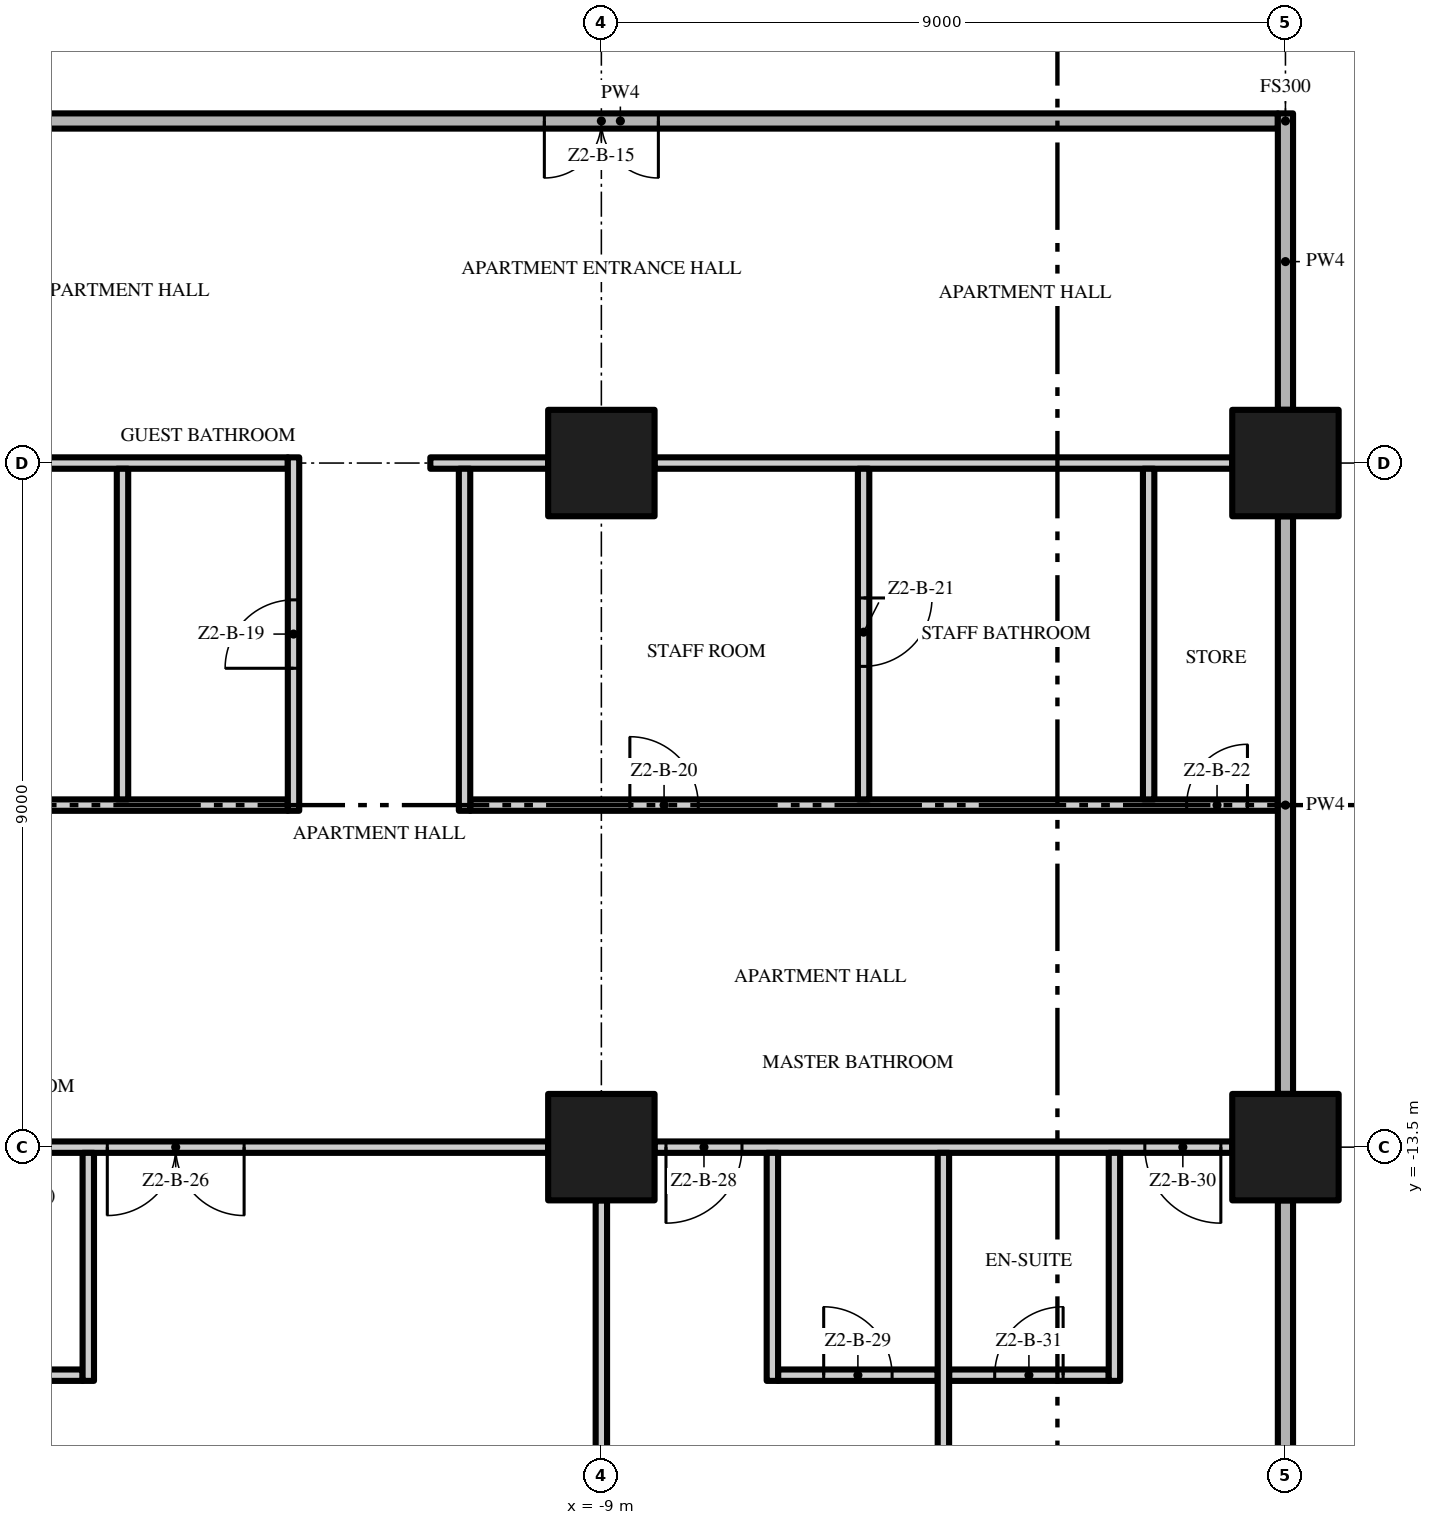
"""IFC4 building model, lengths in metres.
Left out: names, types, materials, properties, quantities, classifications, styles, units other than length and angle.
Written with IfcOpenShell. Run it as: python <this file> out.ifc"""

import sys

from ifc_helpers import new_model, si_unit, direction, frame, frame_2d, origin, origin_2d, place, context, subcontext, project, spatial, rectangle, extrude, element, fill, save


model = new_model("IFC4")
c1 = context("Model", 3, precision=1e-05, world=origin(), true_north=direction((0.0, 1.0)))
c2 = subcontext(c1, "Body", "Model", "MODEL_VIEW")
j1 = project(units=[si_unit("LENGTHUNIT", "METRE"), si_unit("PLANEANGLEUNIT", "RADIAN")], contexts=[c1])
p1 = place(None, origin())
s1 = spatial("IfcSite", under=j1, at=p1, CompositionType="ELEMENT")
p2 = place(p1, origin())
s2 = spatial("IfcBuilding", under=s1, at=p2, CompositionType="ELEMENT")
p3 = place(p2, frame((0.0, 0.0, 80.8)))
s3 = spatial("IfcBuildingStorey", under=s2, at=p3, CompositionType="ELEMENT", Elevation=80.8)
for number, where, z_axis, x_axis in (
    (1, (-9.0, -13.5, 0.0), (0.0, 0.0, 1.0), (1.0, 0.0, 0.0)),
    (2, (-9.0, -4.5, 0.0), (0.0, 0.0, 1.0), (1.0, 0.0, 0.0)),
    (3, (0.0, -13.5, 0.0), (0.0, 0.0, 1.0), (1.0, 0.0, 0.0)),
    (4, (0.0, -4.5, 0.0), (0.0, 0.0, 1.0), (1.0, 0.0, 0.0)),
):
    element("IfcColumn", number, at=place(p3, frame(where, z_axis=z_axis, x_axis=x_axis)), inside=s3, PredefinedType="COLUMN", context=c2, shape_type="SweptSolid", body=[
        extrude(rectangle(XDim=1.4, YDim=1.4, at=origin_2d()), origin(), (0.0, 0.0, 1.0), 3.5),
    ])
p4 = place(p3, frame((-17.925, -16.5, 0.0), z_axis=(0.0, 0.0, 1.0), x_axis=(1.0, 0.0, 0.0)))
e5 = element("IfcWall", 5, at=p4, inside=s3, PredefinedType="PARTITIONING", context=c2, shape_type="SweptSolid", body=[
    extrude(rectangle(XDim=2.1, YDim=0.15, at=frame_2d((1.05, 0.0))), origin(), (0.0, 0.0, 1.0), 3.5),
])
p5 = place(p4, frame((0.6, 0.0, 0.0)))
e6 = element("IfcOpeningElement", 6, at=p5, cuts=e5, PredefinedType="OPENING", context=c2, shape_type="SweptSolid", body=[
    extrude(rectangle(XDim=0.9, YDim=2.1, at=frame_2d((0.45, 1.05))), frame((0.0, 0.085, 0.0), z_axis=(0.0, -1.0, 0.0), x_axis=(1.0, 0.0, 0.0)), (0.0, 0.0, 1.0), 0.17),
])
p6 = place(p3, frame((-6.675, -16.5, 0.0), z_axis=(0.0, 0.0, 1.0), x_axis=(1.0, 0.0, 0.0)))
e7 = element("IfcWall", 7, at=p6, inside=s3, PredefinedType="PARTITIONING", context=c2, shape_type="SweptSolid", body=[
    extrude(rectangle(XDim=2.1, YDim=0.15, at=frame_2d((1.05, 0.0))), origin(), (0.0, 0.0, 1.0), 3.5),
])
p7 = place(p6, frame((0.6, 0.0, 0.0)))
e8 = element("IfcOpeningElement", 8, at=p7, cuts=e7, PredefinedType="OPENING", context=c2, shape_type="SweptSolid", body=[
    extrude(rectangle(XDim=0.9, YDim=2.1, at=frame_2d((0.45, 1.05))), frame((0.0, 0.085, 0.0), z_axis=(0.0, -1.0, 0.0), x_axis=(1.0, 0.0, 0.0)), (0.0, 0.0, 1.0), 0.17),
])
p8 = place(p3, frame((-4.425, -16.5, 0.0), z_axis=(0.0, 0.0, 1.0), x_axis=(1.0, 0.0, 0.0)))
e9 = element("IfcWall", 9, at=p8, inside=s3, PredefinedType="PARTITIONING", context=c2, shape_type="SweptSolid", body=[
    extrude(rectangle(XDim=2.1, YDim=0.15, at=frame_2d((1.05, 0.0))), origin(), (0.0, 0.0, 1.0), 3.5),
])
p9 = place(p8, frame((0.6, 0.0, 0.0)))
e10 = element("IfcOpeningElement", 10, at=p9, cuts=e9, PredefinedType="OPENING", context=c2, shape_type="SweptSolid", body=[
    extrude(rectangle(XDim=0.9, YDim=2.1, at=frame_2d((0.45, 1.05))), frame((0.0, 0.085, 0.0), z_axis=(0.0, -1.0, 0.0), x_axis=(1.0, 0.0, 0.0)), (0.0, 0.0, 1.0), 0.17),
])
p10 = place(p3, frame((-9.7, -13.5, 0.0), z_axis=(0.0, 0.0, 1.0), x_axis=(-1.0, 0.0, 0.0)))
e11 = element("IfcWall", 11, at=p10, inside=s3, PredefinedType="PARTITIONING", context=c2, shape_type="SweptSolid", body=[
    extrude(rectangle(XDim=7.6, YDim=0.15, at=frame_2d((3.8, 0.0))), origin(), (0.0, 0.0, 1.0), 3.5),
])
p11 = place(p10, frame((4.0, 0.0, 0.0)))
e12 = element("IfcOpeningElement", 12, at=p11, cuts=e11, PredefinedType="OPENING", context=c2, shape_type="SweptSolid", body=[
    extrude(rectangle(XDim=1.8, YDim=2.4, at=frame_2d((0.9, 1.2))), frame((0.0, 0.085, 0.0), z_axis=(0.0, -1.0, 0.0), x_axis=(1.0, 0.0, 0.0)), (0.0, 0.0, 1.0), 0.17),
])
p12 = place(p3, frame((-0.7, -13.5, 0.0), z_axis=(0.0, 0.0, 1.0), x_axis=(-1.0, 0.0, 0.0)))
e13 = element("IfcWall", 13, at=p12, inside=s3, PredefinedType="PARTITIONING", context=c2, shape_type="SweptSolid", body=[
    extrude(rectangle(XDim=7.6, YDim=0.15, at=frame_2d((3.8, 0.0))), origin(), (0.0, 0.0, 1.0), 3.5),
])
p13 = place(p12, frame((6.45, 0.0, 0.0)))
e14 = element("IfcOpeningElement", 14, at=p13, cuts=e13, PredefinedType="OPENING", context=c2, shape_type="SweptSolid", body=[
    extrude(rectangle(XDim=1.0, YDim=2.4, at=frame_2d((0.5, 1.2))), frame((0.0, 0.085, 0.0), z_axis=(0.0, -1.0, 0.0), x_axis=(1.0, 0.0, 0.0)), (0.0, 0.0, 1.0), 0.17),
])
p14 = place(p12, frame((0.15, 0.0, 0.0)))
e15 = element("IfcOpeningElement", 15, at=p14, cuts=e13, PredefinedType="OPENING", context=c2, shape_type="SweptSolid", body=[
    extrude(rectangle(XDim=1.0, YDim=2.4, at=frame_2d((0.5, 1.2))), frame((0.0, 0.085, 0.0), z_axis=(0.0, -1.0, 0.0), x_axis=(1.0, 0.0, 0.0)), (0.0, 0.0, 1.0), 0.17),
])
p15 = place(p3, frame((-26.7, -9.0, 0.0), z_axis=(0.0, 0.0, 1.0), x_axis=(1.0, 0.0, 0.0)))
e16 = element("IfcWall", 16, at=p15, inside=s3, PredefinedType="PARTITIONING", context=c2, shape_type="SweptSolid", body=[
    extrude(rectangle(XDim=13.575, YDim=0.15, at=frame_2d((6.787, 0.0))), origin(), (0.0, 0.0, 1.0), 3.5),
])
p16 = place(p3, frame((-10.725, -9.0, 0.0), z_axis=(0.0, 0.0, 1.0), x_axis=(1.0, 0.0, 0.0)))
e17 = element("IfcWall", 17, at=p16, inside=s3, PredefinedType="PARTITIONING", context=c2, shape_type="SweptSolid", body=[
    extrude(rectangle(XDim=10.625, YDim=0.15, at=frame_2d((5.312, 0.0))), origin(), (0.0, 0.0, 1.0), 3.5),
])
p17 = place(p16, frame((2.1, 0.0, 0.0)))
e18 = element("IfcOpeningElement", 18, at=p17, cuts=e17, PredefinedType="OPENING", context=c2, shape_type="SweptSolid", body=[
    extrude(rectangle(XDim=0.9, YDim=2.1, at=frame_2d((0.45, 1.05))), frame((0.0, 0.085, 0.0), z_axis=(0.0, -1.0, 0.0), x_axis=(1.0, 0.0, 0.0)), (0.0, 0.0, 1.0), 0.17),
])
p18 = place(p16, frame((9.425, 0.0, 0.0)))
e19 = element("IfcOpeningElement", 19, at=p18, cuts=e17, PredefinedType="OPENING", context=c2, shape_type="SweptSolid", body=[
    extrude(rectangle(XDim=0.8, YDim=2.0, at=frame_2d((0.4, 1.0))), frame((0.0, 0.085, 0.0), z_axis=(0.0, -1.0, 0.0), x_axis=(1.0, 0.0, 0.0)), (0.0, 0.0, 1.0), 0.17),
])
p19 = place(p3, frame((-17.3, -4.5, 0.0), z_axis=(0.0, 0.0, 1.0), x_axis=(1.0, 0.0, 0.0)))
e20 = element("IfcWall", 20, at=p19, inside=s3, PredefinedType="PARTITIONING", context=c2, shape_type="SweptSolid", body=[
    extrude(rectangle(XDim=4.175, YDim=0.15, at=frame_2d((2.087, 0.0))), origin(), (0.0, 0.0, 1.0), 3.5),
])
p20 = place(p3, frame((-11.25, -4.5, 0.0), z_axis=(0.0, 0.0, 1.0), x_axis=(1.0, 0.0, 0.0)))
e21 = element("IfcWall", 21, at=p20, inside=s3, PredefinedType="PARTITIONING", context=c2, shape_type="SweptSolid", body=[
    extrude(rectangle(XDim=1.55, YDim=0.15, at=frame_2d((0.775, 0.0))), origin(), (0.0, 0.0, 1.0), 3.5),
])
p21 = place(p3, frame((-8.3, -4.5, 0.0), z_axis=(0.0, 0.0, 1.0), x_axis=(1.0, 0.0, 0.0)))
e22 = element("IfcWall", 22, at=p21, inside=s3, PredefinedType="PARTITIONING", context=c2, shape_type="SweptSolid", body=[
    extrude(rectangle(XDim=7.6, YDim=0.15, at=frame_2d((3.8, 0.0))), origin(), (0.0, 0.0, 1.0), 3.5),
])
p22 = place(p3, frame((-0.1, 0.0, 0.0), z_axis=(0.0, 0.0, 1.0), x_axis=(-1.0, 0.0, 0.0)))
e23 = element("IfcWall", 23, at=p22, inside=s3, PredefinedType="PARTITIONING", context=c2, shape_type="SweptSolid", body=[
    extrude(rectangle(XDim=17.3, YDim=0.2, at=frame_2d((8.65, 0.0))), origin(), (0.0, 0.0, 1.0), 3.5),
])
p23 = place(p22, frame((8.15, 0.0, 0.0)))
e24 = element("IfcOpeningElement", 24, at=p23, cuts=e23, PredefinedType="OPENING", context=c2, shape_type="SweptSolid", body=[
    extrude(rectangle(XDim=1.5, YDim=2.4, at=frame_2d((0.75, 1.2))), frame((0.0, 0.11, 0.0), z_axis=(0.0, -1.0, 0.0), x_axis=(1.0, 0.0, 0.0)), (0.0, 0.0, 1.0), 0.22),
])
p24 = place(p3, frame((-15.75, -16.575, 0.0), z_axis=(0.0, 0.0, 1.0), x_axis=(0.0, 1.0, 0.0)))
e25 = element("IfcWall", 25, at=p24, inside=s3, PredefinedType="PARTITIONING", context=c2, shape_type="SweptSolid", body=[
    extrude(rectangle(XDim=3.0, YDim=0.15, at=frame_2d((1.5, 0.0))), origin(), (0.0, 0.0, 1.0), 3.5),
])
p25 = place(p3, frame((-15.3, -8.925, 0.0), z_axis=(0.0, 0.0, 1.0), x_axis=(0.0, 1.0, 0.0)))
e26 = element("IfcWall", 26, at=p25, inside=s3, PredefinedType="PARTITIONING", context=c2, shape_type="SweptSolid", body=[
    extrude(rectangle(XDim=4.35, YDim=0.15, at=frame_2d((2.175, 0.0))), origin(), (0.0, 0.0, 1.0), 3.5),
])
p26 = place(p3, frame((-13.05, -9.075, 0.0), z_axis=(0.0, 0.0, 1.0), x_axis=(0.0, 1.0, 0.0)))
e27 = element("IfcWall", 27, at=p26, inside=s3, PredefinedType="PARTITIONING", context=c2, shape_type="SweptSolid", body=[
    extrude(rectangle(XDim=4.65, YDim=0.15, at=frame_2d((2.325, 0.0))), origin(), (0.0, 0.0, 1.0), 3.5),
])
p27 = place(p26, frame((1.875, 0.0, 0.0)))
e28 = element("IfcOpeningElement", 28, at=p27, cuts=e27, PredefinedType="OPENING", context=c2, shape_type="SweptSolid", body=[
    extrude(rectangle(XDim=0.9, YDim=2.1, at=frame_2d((0.45, 1.05))), frame((0.0, 0.085, 0.0), z_axis=(0.0, -1.0, 0.0), x_axis=(1.0, 0.0, 0.0)), (0.0, 0.0, 1.0), 0.17),
])
p28 = place(p3, frame((-10.8, -9.075, 0.0), z_axis=(0.0, 0.0, 1.0), x_axis=(0.0, 1.0, 0.0)))
e29 = element("IfcWall", 29, at=p28, inside=s3, PredefinedType="PARTITIONING", context=c2, shape_type="SweptSolid", body=[
    extrude(rectangle(XDim=4.5, YDim=0.15, at=frame_2d((2.25, 0.0))), origin(), (0.0, 0.0, 1.0), 3.5),
])
p29 = place(p3, frame((-9.0, -21.2, 0.0), z_axis=(0.0, 0.0, 1.0), x_axis=(0.0, 1.0, 0.0)))
e30 = element("IfcWall", 30, at=p29, inside=s3, PredefinedType="PARTITIONING", context=c2, shape_type="SweptSolid", body=[
    extrude(rectangle(XDim=7.0, YDim=0.15, at=frame_2d((3.5, 0.0))), origin(), (0.0, 0.0, 1.0), 3.5),
])
p30 = place(p3, frame((-6.75, -16.575, 0.0), z_axis=(0.0, 0.0, 1.0), x_axis=(0.0, 1.0, 0.0)))
e31 = element("IfcWall", 31, at=p30, inside=s3, PredefinedType="PARTITIONING", context=c2, shape_type="SweptSolid", body=[
    extrude(rectangle(XDim=3.0, YDim=0.15, at=frame_2d((1.5, 0.0))), origin(), (0.0, 0.0, 1.0), 3.5),
])
p31 = place(p3, frame((-5.55, -4.575, 0.0), z_axis=(0.0, 0.0, 1.0), x_axis=(0.0, -1.0, 0.0)))
e32 = element("IfcWall", 32, at=p31, inside=s3, PredefinedType="PARTITIONING", context=c2, shape_type="SweptSolid", body=[
    extrude(rectangle(XDim=4.35, YDim=0.15, at=frame_2d((2.175, 0.0))), origin(), (0.0, 0.0, 1.0), 3.5),
])
p32 = place(p31, frame((1.7, 0.0, 0.0)))
e33 = element("IfcOpeningElement", 33, at=p32, cuts=e32, PredefinedType="OPENING", context=c2, shape_type="SweptSolid", body=[
    extrude(rectangle(XDim=0.9, YDim=2.1, at=frame_2d((0.45, 1.05))), frame((0.0, 0.085, 0.0), z_axis=(0.0, -1.0, 0.0), x_axis=(1.0, 0.0, 0.0)), (0.0, 0.0, 1.0), 0.17),
])
p33 = place(p3, frame((-4.5, -22.2, 0.0), z_axis=(0.0, 0.0, 1.0), x_axis=(0.0, 1.0, 0.0)))
e34 = element("IfcWall", 34, at=p33, inside=s3, PredefinedType="PARTITIONING", context=c2, shape_type="SweptSolid", body=[
    extrude(rectangle(XDim=8.625, YDim=0.15, at=frame_2d((4.312, 0.0))), origin(), (0.0, 0.0, 1.0), 3.5),
])
p34 = place(p3, frame((-2.25, -16.575, 0.0), z_axis=(0.0, 0.0, 1.0), x_axis=(0.0, 1.0, 0.0)))
e35 = element("IfcWall", 35, at=p34, inside=s3, PredefinedType="PARTITIONING", context=c2, shape_type="SweptSolid", body=[
    extrude(rectangle(XDim=3.0, YDim=0.15, at=frame_2d((1.5, 0.0))), origin(), (0.0, 0.0, 1.0), 3.5),
])
p35 = place(p3, frame((-1.8, -8.925, 0.0), z_axis=(0.0, 0.0, 1.0), x_axis=(0.0, 1.0, 0.0)))
e36 = element("IfcWall", 36, at=p35, inside=s3, PredefinedType="PARTITIONING", context=c2, shape_type="SweptSolid", body=[
    extrude(rectangle(XDim=4.35, YDim=0.15, at=frame_2d((2.175, 0.0))), origin(), (0.0, 0.0, 1.0), 3.5),
])
p36 = place(p3, frame((0.0, -21.2, 0.0), z_axis=(0.0, 0.0, 1.0), x_axis=(0.0, 1.0, 0.0)))
e37 = element("IfcWall", 37, at=p36, inside=s3, PredefinedType="PARTITIONING", context=c2, shape_type="SweptSolid", body=[
    extrude(rectangle(XDim=7.0, YDim=0.2, at=frame_2d((3.5, 0.0))), origin(), (0.0, 0.0, 1.0), 3.5),
])
p37 = place(p3, frame((0.0, -12.8, 0.0), z_axis=(0.0, 0.0, 1.0), x_axis=(0.0, 1.0, 0.0)))
e38 = element("IfcWall", 38, at=p37, inside=s3, PredefinedType="PARTITIONING", context=c2, shape_type="SweptSolid", body=[
    extrude(rectangle(XDim=7.6, YDim=0.2, at=frame_2d((3.8, 0.0))), origin(), (0.0, 0.0, 1.0), 3.5),
])
p38 = place(p3, frame((0.0, -3.8, 0.0), z_axis=(0.0, 0.0, 1.0), x_axis=(0.0, 1.0, 0.0)))
e39 = element("IfcWall", 39, at=p38, inside=s3, PredefinedType="PARTITIONING", context=c2, shape_type="SweptSolid", body=[
    extrude(rectangle(XDim=3.9, YDim=0.2, at=frame_2d((1.95, 0.0))), origin(), (0.0, 0.0, 1.0), 3.5),
])
p39 = place(p23, origin())
e40 = element("IfcDoor", 40, at=p39, inside=s3, OperationType="DOUBLE_DOOR_SINGLE_SWING", PredefinedType="DOOR", context=c2, shape_type="SweptSolid", body=[
    extrude(rectangle(XDim=1.5, YDim=2.4, at=frame_2d((0.75, 1.2))), frame((0.0, 0.025, 0.0), z_axis=(0.0, -1.0, 0.0), x_axis=(1.0, 0.0, 0.0)), (0.0, 0.0, 1.0), 0.05),
])
fill(e24, e40)
p40 = place(p27, origin())
e41 = element("IfcDoor", 41, at=p40, inside=s3, OperationType="SINGLE_SWING_LEFT", PredefinedType="DOOR", context=c2, shape_type="SweptSolid", body=[
    extrude(rectangle(XDim=0.9, YDim=2.1, at=frame_2d((0.45, 1.05))), frame((0.0, 0.025, 0.0), z_axis=(0.0, -1.0, 0.0), x_axis=(1.0, 0.0, 0.0)), (0.0, 0.0, 1.0), 0.05),
])
fill(e28, e41)
p41 = place(p17, origin())
e42 = element("IfcDoor", 42, at=p41, inside=s3, OperationType="SINGLE_SWING_LEFT", PredefinedType="DOOR", context=c2, shape_type="SweptSolid", body=[
    extrude(rectangle(XDim=0.9, YDim=2.1, at=frame_2d((0.45, 1.05))), frame((0.0, 0.025, 0.0), z_axis=(0.0, -1.0, 0.0), x_axis=(1.0, 0.0, 0.0)), (0.0, 0.0, 1.0), 0.05),
])
fill(e18, e42)
p42 = place(p32, origin())
e43 = element("IfcDoor", 43, at=p42, inside=s3, OperationType="SINGLE_SWING_LEFT", PredefinedType="DOOR", context=c2, shape_type="SweptSolid", body=[
    extrude(rectangle(XDim=0.9, YDim=2.1, at=frame_2d((0.45, 1.05))), frame((0.0, 0.025, 0.0), z_axis=(0.0, -1.0, 0.0), x_axis=(1.0, 0.0, 0.0)), (0.0, 0.0, 1.0), 0.05),
])
fill(e33, e43)
p43 = place(p18, origin())
e44 = element("IfcDoor", 44, at=p43, inside=s3, OperationType="SINGLE_SWING_RIGHT", PredefinedType="DOOR", context=c2, shape_type="SweptSolid", body=[
    extrude(rectangle(XDim=0.8, YDim=2.0, at=frame_2d((0.4, 1.0))), frame((0.0, 0.025, 0.0), z_axis=(0.0, -1.0, 0.0), x_axis=(1.0, 0.0, 0.0)), (0.0, 0.0, 1.0), 0.05),
])
fill(e19, e44)
p44 = place(p11, origin())
e45 = element("IfcDoor", 45, at=p44, inside=s3, OperationType="DOUBLE_DOOR_SINGLE_SWING", PredefinedType="DOOR", context=c2, shape_type="SweptSolid", body=[
    extrude(rectangle(XDim=1.8, YDim=2.4, at=frame_2d((0.9, 1.2))), frame((0.0, 0.025, 0.0), z_axis=(0.0, -1.0, 0.0), x_axis=(1.0, 0.0, 0.0)), (0.0, 0.0, 1.0), 0.05),
])
fill(e12, e45)
p45 = place(p13, origin())
e46 = element("IfcDoor", 46, at=p45, inside=s3, OperationType="SINGLE_SWING_RIGHT", PredefinedType="DOOR", context=c2, shape_type="SweptSolid", body=[
    extrude(rectangle(XDim=1.0, YDim=2.4, at=frame_2d((0.5, 1.2))), frame((0.0, 0.025, 0.0), z_axis=(0.0, -1.0, 0.0), x_axis=(1.0, 0.0, 0.0)), (0.0, 0.0, 1.0), 0.05),
])
fill(e14, e46)
p46 = place(p7, origin())
e47 = element("IfcDoor", 47, at=p46, inside=s3, OperationType="SINGLE_SWING_LEFT", PredefinedType="DOOR", context=c2, shape_type="SweptSolid", body=[
    extrude(rectangle(XDim=0.9, YDim=2.1, at=frame_2d((0.45, 1.05))), frame((0.0, 0.025, 0.0), z_axis=(0.0, -1.0, 0.0), x_axis=(1.0, 0.0, 0.0)), (0.0, 0.0, 1.0), 0.05),
])
fill(e8, e47)
p47 = place(p14, origin())
e48 = element("IfcDoor", 48, at=p47, inside=s3, OperationType="SINGLE_SWING_LEFT", PredefinedType="DOOR", context=c2, shape_type="SweptSolid", body=[
    extrude(rectangle(XDim=1.0, YDim=2.4, at=frame_2d((0.5, 1.2))), frame((0.0, 0.025, 0.0), z_axis=(0.0, -1.0, 0.0), x_axis=(1.0, 0.0, 0.0)), (0.0, 0.0, 1.0), 0.05),
])
fill(e15, e48)
p48 = place(p9, origin())
e49 = element("IfcDoor", 49, at=p48, inside=s3, OperationType="SINGLE_SWING_RIGHT", PredefinedType="DOOR", context=c2, shape_type="SweptSolid", body=[
    extrude(rectangle(XDim=0.9, YDim=2.1, at=frame_2d((0.45, 1.05))), frame((0.0, 0.025, 0.0), z_axis=(0.0, -1.0, 0.0), x_axis=(1.0, 0.0, 0.0)), (0.0, 0.0, 1.0), 0.05),
])
fill(e10, e49)
save(model, sys.argv[1])
